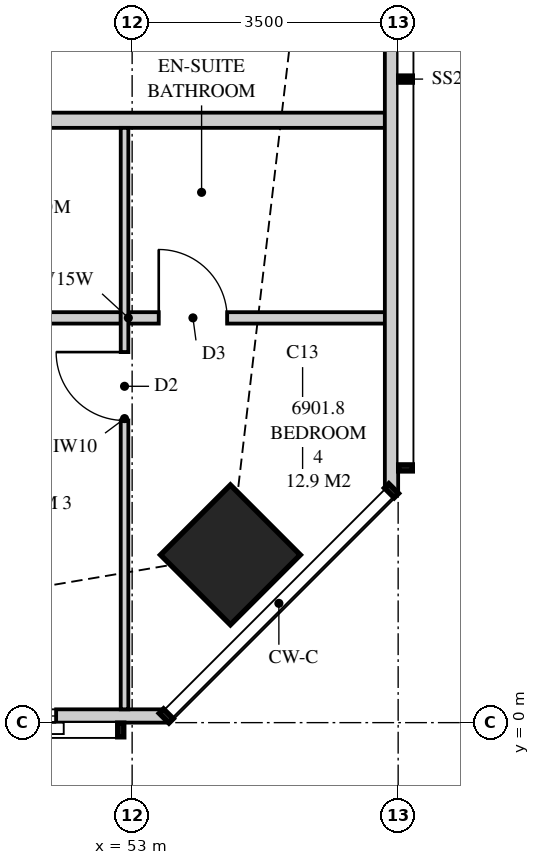
"""IFC4 building model, lengths in metres.
Left out: names, types, materials, properties, quantities, classifications, styles, units other than length and angle.
Written with IfcOpenShell. Run it as: python <this file> out.ifc"""

import sys

from ifc_helpers import new_model, si_unit, direction, frame, frame_2d, origin, origin_2d, place, context, subcontext, project, spatial, polyline, rectangle, outline, extrude, element, fill, save


model = new_model("IFC4")
c1 = context("Model", 3, precision=1e-05, world=origin(), true_north=direction((0.0, 1.0)))
c2 = subcontext(c1, "Body", "Model", "MODEL_VIEW")
j1 = project(units=[si_unit("LENGTHUNIT", "METRE"), si_unit("PLANEANGLEUNIT", "RADIAN")], contexts=[c1])
p1 = place(None, origin())
s1 = spatial("IfcSite", under=j1, at=p1, CompositionType="ELEMENT")
p2 = place(p1, origin())
s2 = spatial("IfcBuilding", under=s1, at=p2, CompositionType="ELEMENT")
p3 = place(p2, frame((0.0, 0.0, 252.95)))
s3 = spatial("IfcBuildingStorey", under=s2, at=p3, CompositionType="ELEMENT", Elevation=252.95)
p4 = place(p3, frame((54.293, 2.207, 0.0), z_axis=(0.0, 0.0, 1.0), x_axis=(0.707106781187, 0.707106781187, 0.0)))
e1 = element("IfcColumn", 1, at=p4, inside=s3, PredefinedType="COLUMN", context=c2, shape_type="SweptSolid", body=[
    extrude(rectangle(XDim=1.3, YDim=1.3, at=origin_2d()), origin(), (0.0, 0.0, 1.0), 3.5),
])
p5 = place(p3, frame((19.851, 0.087, 0.0), z_axis=(0.0, 0.0, 1.0), x_axis=(1.0, 0.0, 0.0)))
e2 = element("IfcWall", 2, at=p5, inside=s3, PredefinedType="SOLIDWALL", context=c2, shape_type="SweptSolid", body=[
    extrude(outline(polyline([(0.0, 0.0), (33.597, 0.0), (33.597, 3.26), (27.239, 3.26), (27.239, 2.3), (27.155, 2.3), (27.155, 3.26), (27.024, 3.26), (27.024, 2.3), (7.774, 2.3), (7.774, 3.26), (7.642, 3.26), (7.642, 2.3), (7.559, 2.3), (7.559, 3.26), (0.0, 3.26), (0.0, 0.0)])), frame((0.0, 0.087, 0.0), z_axis=(0.0, -1.0, 0.0), x_axis=(1.0, 0.0, 0.0)), (0.0, 0.0, 1.0), 0.175),
])
p6 = place(p5, frame((2.649, 0.0, 0.4)))
e3 = element("IfcOpeningElement", 3, at=p6, cuts=e2, PredefinedType="OPENING", context=c2, shape_type="SweptSolid", body=[
    extrude(rectangle(XDim=1.8, YDim=1.85, at=frame_2d((0.9, 0.925))), frame((0.0, 0.097, 0.0), z_axis=(0.0, -1.0, 0.0), x_axis=(1.0, 0.0, 0.0)), (0.0, 0.0, 1.0), 0.195),
])
p7 = place(p5, frame((8.625, 0.0, 0.4)))
e4 = element("IfcOpeningElement", 4, at=p7, cuts=e2, PredefinedType="OPENING", context=c2, shape_type="SweptSolid", body=[
    extrude(rectangle(XDim=1.8, YDim=1.85, at=frame_2d((0.9, 0.925))), frame((0.0, 0.097, 0.0), z_axis=(0.0, -1.0, 0.0), x_axis=(1.0, 0.0, 0.0)), (0.0, 0.0, 1.0), 0.195),
])
p8 = place(p5, frame((11.499, 0.0, 0.4)))
e5 = element("IfcOpeningElement", 5, at=p8, cuts=e2, PredefinedType="OPENING", context=c2, shape_type="SweptSolid", body=[
    extrude(rectangle(XDim=1.8, YDim=1.85, at=frame_2d((0.9, 0.925))), frame((0.0, 0.097, 0.0), z_axis=(0.0, -1.0, 0.0), x_axis=(1.0, 0.0, 0.0)), (0.0, 0.0, 1.0), 0.195),
])
p9 = place(p5, frame((14.359, 0.0, 0.0)))
e6 = element("IfcOpeningElement", 6, at=p9, cuts=e2, PredefinedType="OPENING", context=c2, shape_type="SweptSolid", body=[
    extrude(rectangle(XDim=1.8, YDim=2.25, at=frame_2d((0.9, 1.125))), frame((0.0, 0.097, 0.0), z_axis=(0.0, -1.0, 0.0), x_axis=(1.0, 0.0, 0.0)), (0.0, 0.0, 1.0), 0.195),
])
p10 = place(p5, frame((19.299, 0.0, 0.4)))
e7 = element("IfcOpeningElement", 7, at=p10, cuts=e2, PredefinedType="OPENING", context=c2, shape_type="SweptSolid", body=[
    extrude(rectangle(XDim=1.8, YDim=1.85, at=frame_2d((0.9, 0.925))), frame((0.0, 0.097, 0.0), z_axis=(0.0, -1.0, 0.0), x_axis=(1.0, 0.0, 0.0)), (0.0, 0.0, 1.0), 0.195),
])
p11 = place(p5, frame((23.674, 0.0, 0.4)))
e8 = element("IfcOpeningElement", 8, at=p11, cuts=e2, PredefinedType="OPENING", context=c2, shape_type="SweptSolid", body=[
    extrude(rectangle(XDim=2.4, YDim=1.85, at=frame_2d((1.2, 0.925))), frame((0.0, 0.097, 0.0), z_axis=(0.0, -1.0, 0.0), x_axis=(1.0, 0.0, 0.0)), (0.0, 0.0, 1.0), 0.195),
])
p12 = place(p5, frame((30.349, 0.0, 0.4)))
e9 = element("IfcOpeningElement", 9, at=p12, cuts=e2, PredefinedType="OPENING", context=c2, shape_type="SweptSolid", body=[
    extrude(rectangle(XDim=1.8, YDim=1.85, at=frame_2d((0.9, 0.925))), frame((0.0, 0.097, 0.0), z_axis=(0.0, -1.0, 0.0), x_axis=(1.0, 0.0, 0.0)), (0.0, 0.0, 1.0), 0.195),
])
p13 = place(p3, frame((56.413, 3.051, 0.0), z_axis=(0.0, 0.0, 1.0), x_axis=(0.0, 1.0, 0.0)))
e10 = element("IfcWall", 10, at=p13, inside=s3, PredefinedType="SOLIDWALL", context=c2, shape_type="SweptSolid", body=[
    extrude(outline(polyline([(0.0, 0.0), (27.897, 0.0), (27.897, 3.26), (22.157, 3.26), (22.157, 2.3), (22.092, 2.3), (22.092, 3.26), (21.949, 3.26), (21.949, 2.3), (9.949, 2.3), (9.949, 3.26), (9.858, 3.26), (9.858, 2.3), (9.688, 2.3), (9.688, 3.26), (0.0, 3.26), (0.0, 0.0)])), frame((0.0, 0.087, 0.0), z_axis=(0.0, -1.0, 0.0), x_axis=(1.0, 0.0, 0.0)), (0.0, 0.0, 1.0), 0.175),
])
p14 = place(p13, frame((10.831, 0.0, 0.4)))
e11 = element("IfcOpeningElement", 11, at=p14, cuts=e10, PredefinedType="OPENING", context=c2, shape_type="SweptSolid", body=[
    extrude(rectangle(XDim=2.4, YDim=1.85, at=frame_2d((1.2, 0.925))), frame((0.0, 0.097, 0.0), z_axis=(0.0, -1.0, 0.0), x_axis=(1.0, 0.0, 0.0)), (0.0, 0.0, 1.0), 0.195),
])
p15 = place(p13, frame((15.074, 0.0, 0.0)))
e12 = element("IfcOpeningElement", 12, at=p15, cuts=e10, PredefinedType="OPENING", context=c2, shape_type="SweptSolid", body=[
    extrude(rectangle(XDim=1.8, YDim=2.25, at=frame_2d((0.9, 1.125))), frame((0.0, 0.097, 0.0), z_axis=(0.0, -1.0, 0.0), x_axis=(1.0, 0.0, 0.0)), (0.0, 0.0, 1.0), 0.195),
])
p16 = place(p13, frame((18.699, 0.0, 0.4)))
e13 = element("IfcOpeningElement", 13, at=p16, cuts=e10, PredefinedType="OPENING", context=c2, shape_type="SweptSolid", body=[
    extrude(rectangle(XDim=2.4, YDim=1.85, at=frame_2d((1.2, 0.925))), frame((0.0, 0.097, 0.0), z_axis=(0.0, -1.0, 0.0), x_axis=(1.0, 0.0, 0.0)), (0.0, 0.0, 1.0), 0.195),
])
p17 = place(p3, frame((18.0, 7.925, 0.0), z_axis=(0.0, 0.0, 1.0), x_axis=(1.0, 0.0, 0.0)))
e14 = element("IfcWall", 14, at=p17, inside=s3, PredefinedType="PARTITIONING", context=c2, shape_type="SweptSolid", body=[
    extrude(outline(polyline([(0.0, 0.0), (38.325, 0.0), (38.325, 3.26), (37.875, 3.26), (37.875, 2.3), (36.043, 2.3), (36.043, 3.26), (30.185, 3.26), (30.185, 2.66), (27.565, 2.66), (27.565, 3.26), (20.56, 3.26), (20.56, 2.66), (17.94, 2.66), (17.94, 3.26), (10.935, 3.26), (10.935, 2.66), (8.315, 2.66), (8.315, 3.26), (1.839, 3.26), (1.839, 2.3), (0.0, 2.3), (0.0, 3.26), (0.0, 0.0)])), frame((0.0, 0.1, 0.0), z_axis=(0.0, -1.0, 0.0), x_axis=(1.0, 0.0, 0.0)), (0.0, 0.0, 1.0), 0.2),
])
p18 = place(p17, frame((18.75, 0.0, 0.0)))
e15 = element("IfcOpeningElement", 15, at=p18, cuts=e14, PredefinedType="OPENING", context=c2, shape_type="SweptSolid", body=[
    extrude(rectangle(XDim=1.05, YDim=2.2, at=frame_2d((0.525, 1.1))), frame((0.0, 0.11, 0.0), z_axis=(0.0, -1.0, 0.0), x_axis=(1.0, 0.0, 0.0)), (0.0, 0.0, 1.0), 0.22),
])
p19 = place(p3, frame((52.9, 0.175, 0.0), z_axis=(0.0, 0.0, 1.0), x_axis=(0.0, 1.0, 0.0)))
e16 = element("IfcWall", 16, at=p19, inside=s3, PredefinedType="PARTITIONING", context=c2, shape_type="SweptSolid", body=[
    extrude(outline(polyline([(0.0, 0.0), (7.65, 0.0), (7.65, 3.26), (2.668, 3.26), (2.668, 2.3), (0.924, 2.3), (0.924, 3.26), (0.0, 3.26), (0.0, 0.0)])), frame((0.0, 0.05, 0.0), z_axis=(0.0, -1.0, 0.0), x_axis=(1.0, 0.0, 0.0)), (0.0, 0.0, 1.0), 0.1),
])
p20 = place(p19, frame((3.8, 0.0, 0.0)))
e17 = element("IfcOpeningElement", 17, at=p20, cuts=e16, PredefinedType="OPENING", context=c2, shape_type="SweptSolid", body=[
    extrude(rectangle(XDim=0.9, YDim=2.1, at=frame_2d((0.45, 1.05))), frame((0.0, 0.06, 0.0), z_axis=(0.0, -1.0, 0.0), x_axis=(1.0, 0.0, 0.0)), (0.0, 0.0, 1.0), 0.12),
])
p21 = place(p3, frame((49.35, 5.325, 0.0), z_axis=(0.0, 0.0, 1.0), x_axis=(1.0, 0.0, 0.0)))
e18 = element("IfcWall", 18, at=p21, inside=s3, PredefinedType="PLUMBINGWALL", context=c2, shape_type="SweptSolid", body=[
    extrude(rectangle(XDim=3.5, YDim=0.15, at=frame_2d((1.75, 0.0))), origin(), (0.0, 0.0, 1.0), 3.26),
])
p22 = place(p3, frame((52.95, 5.325, 0.0), z_axis=(0.0, 0.0, 1.0), x_axis=(1.0, 0.0, 0.0)))
e19 = element("IfcWall", 19, at=p22, inside=s3, PredefinedType="PLUMBINGWALL", context=c2, shape_type="SweptSolid", body=[
    extrude(outline(polyline([(0.0, 0.0), (3.55, 0.0), (3.55, 3.26), (2.597, 3.26), (2.597, 2.3), (0.815, 2.3), (0.815, 3.26), (0.0, 3.26), (0.0, 0.0)])), frame((0.0, 0.075, 0.0), z_axis=(0.0, -1.0, 0.0), x_axis=(1.0, 0.0, 0.0)), (0.0, 0.0, 1.0), 0.15),
])
p23 = place(p22, frame((0.4, 0.0, 0.0)))
e20 = element("IfcOpeningElement", 20, at=p23, cuts=e19, PredefinedType="OPENING", context=c2, shape_type="SweptSolid", body=[
    extrude(rectangle(XDim=0.9, YDim=2.1, at=frame_2d((0.45, 1.05))), frame((0.0, 0.085, 0.0), z_axis=(0.0, -1.0, 0.0), x_axis=(1.0, 0.0, 0.0)), (0.0, 0.0, 1.0), 0.17),
])
p24 = place(p12, origin())
e21 = element("IfcWindow", 21, at=p24, inside=s3, PartitioningType="SINGLE_PANEL", PredefinedType="WINDOW", context=c2, shape_type="SweptSolid", body=[
    extrude(rectangle(XDim=1.8, YDim=1.85, at=frame_2d((0.9, 0.925))), frame((0.0, 0.03, 0.0), z_axis=(0.0, -1.0, 0.0), x_axis=(1.0, 0.0, 0.0)), (0.0, 0.0, 1.0), 0.06),
])
fill(e9, e21)
p25 = place(p20, origin())
e22 = element("IfcDoor", 22, at=p25, inside=s3, OperationType="SINGLE_SWING_RIGHT", PredefinedType="DOOR", context=c2, shape_type="SweptSolid", body=[
    extrude(rectangle(XDim=0.9, YDim=2.1, at=frame_2d((0.45, 1.05))), frame((0.0, 0.025, 0.0), z_axis=(0.0, -1.0, 0.0), x_axis=(1.0, 0.0, 0.0)), (0.0, 0.0, 1.0), 0.05),
])
fill(e17, e22)
p26 = place(p23, origin())
e23 = element("IfcDoor", 23, at=p26, inside=s3, OperationType="SINGLE_SWING_LEFT", PredefinedType="DOOR", context=c2, shape_type="SweptSolid", body=[
    extrude(rectangle(XDim=0.9, YDim=2.1, at=frame_2d((0.45, 1.05))), frame((0.0, 0.025, 0.0), z_axis=(0.0, -1.0, 0.0), x_axis=(1.0, 0.0, 0.0)), (0.0, 0.0, 1.0), 0.05),
])
fill(e20, e23)
save(model, sys.argv[1])
